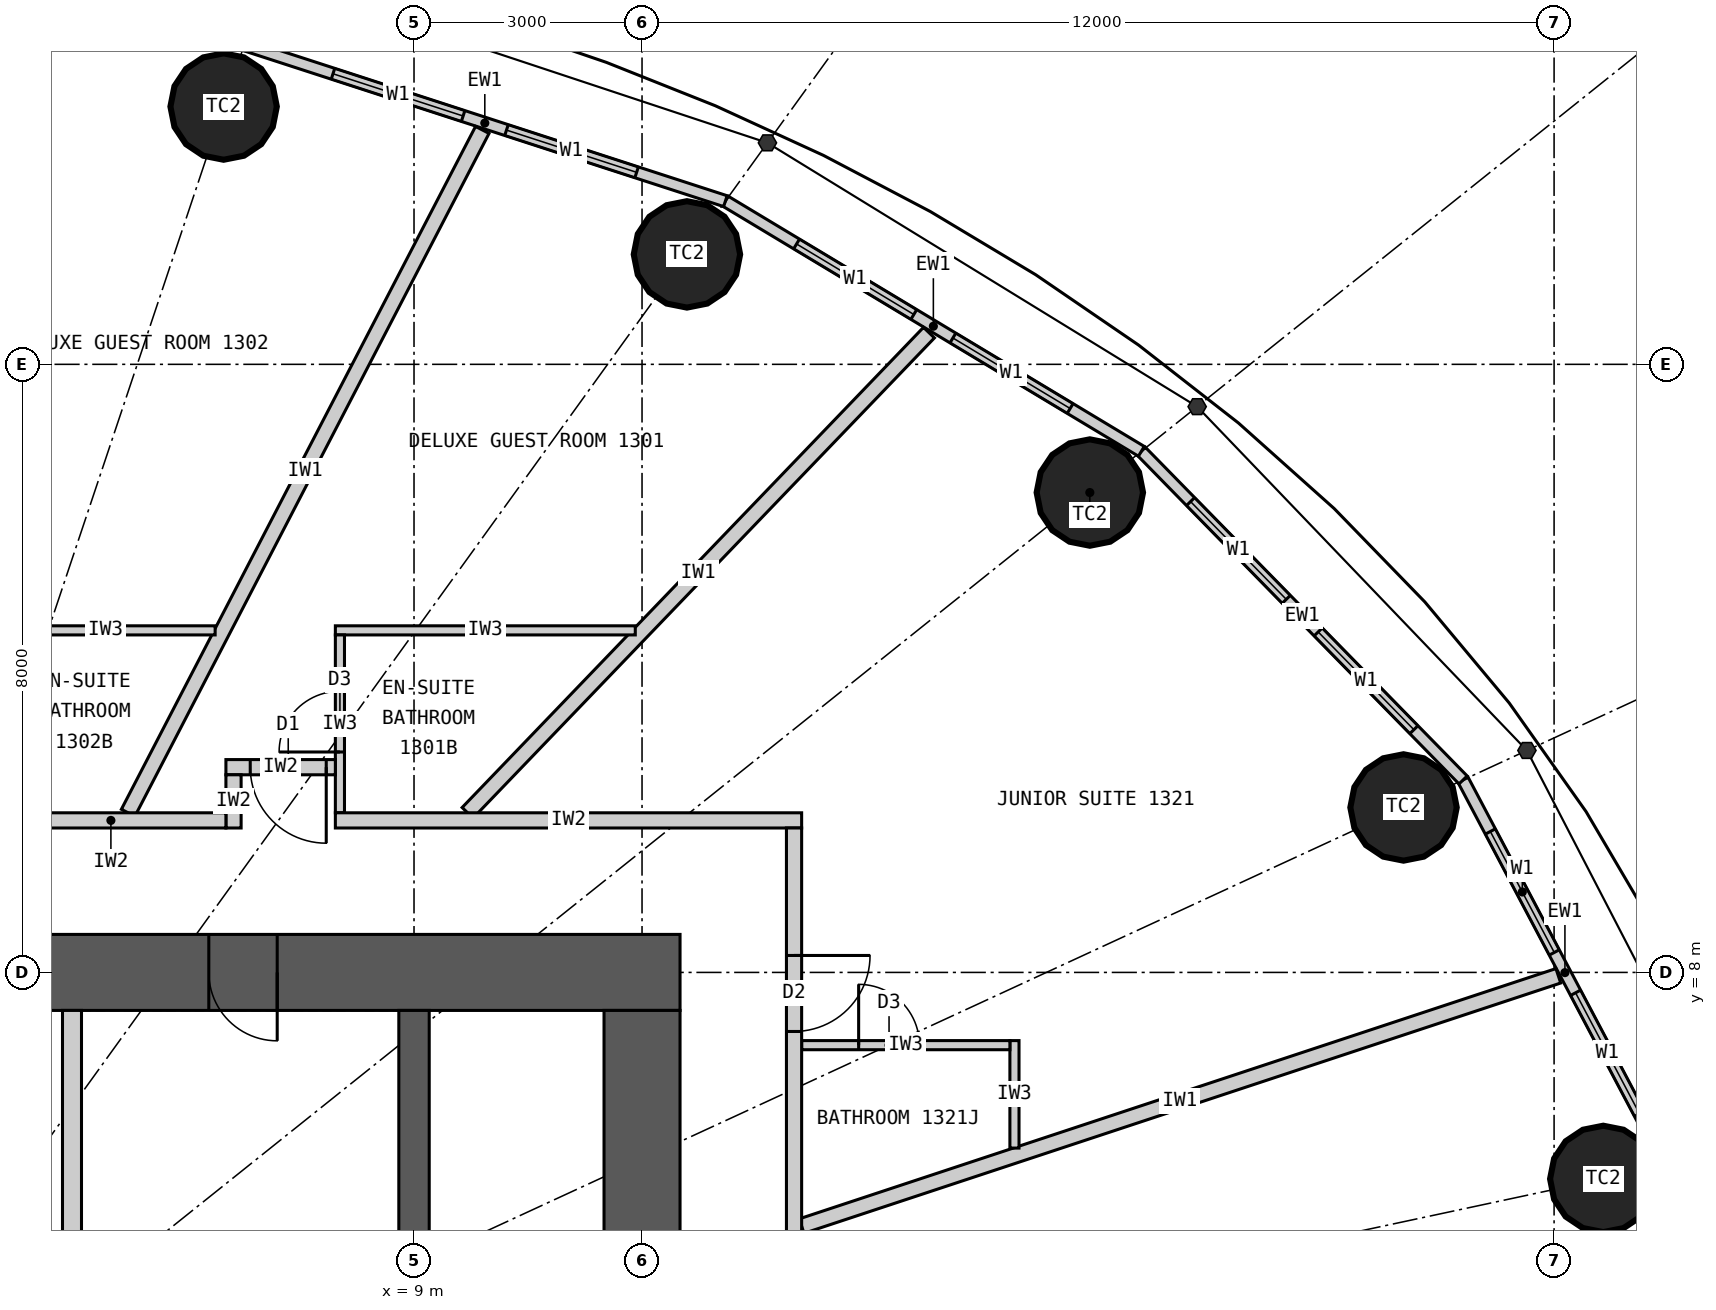
"""IFC4 building model, lengths in metres.
Left out: names, types, materials, properties, quantities, classifications, styles, units other than length and angle.
Written with IfcOpenShell. Run it as: python <this file> out.ifc"""

import sys

from ifc_helpers import new_model, si_unit, direction, frame, frame_2d, origin, origin_2d, place, context, subcontext, project, spatial, rectangle, circle, extrude, element, fill, save


model = new_model("IFC4")
c1 = context("Model", 3, precision=1e-05, world=origin(), true_north=direction((0.0, 1.0)))
c2 = subcontext(c1, "Body", "Model", "MODEL_VIEW")
j1 = project(units=[si_unit("LENGTHUNIT", "METRE"), si_unit("PLANEANGLEUNIT", "RADIAN")], contexts=[c1])
p1 = place(None, origin())
s1 = spatial("IfcSite", under=j1, at=p1, CompositionType="ELEMENT")
p2 = place(p1, origin())
s2 = spatial("IfcBuilding", under=s1, at=p2, CompositionType="ELEMENT")
p3 = place(p2, frame((0.0, 0.0, 57.3)))
s3 = spatial("IfcBuildingStorey", under=s2, at=p3, CompositionType="ELEMENT", Elevation=57.3)
for number, where, z_axis, x_axis in (
    (1, (24.647, 5.283, 0.0), (0.0, 0.0, 1.0), (1.0, 0.0, 0.0)),
    (2, (22.019, 10.17, 0.0), (0.0, 0.0, 1.0), (1.0, 0.0, 0.0)),
    (3, (17.892, 14.313, 0.0), (0.0, 0.0, 1.0), (1.0, 0.0, 0.0)),
    (4, (12.591, 17.447, 0.0), (0.0, 0.0, 1.0), (1.0, 0.0, 0.0)),
    (5, (6.495, 19.391, 0.0), (0.0, 0.0, 1.0), (1.0, 0.0, 0.0)),
):
    element("IfcColumn", number, at=place(p3, frame(where, z_axis=z_axis, x_axis=x_axis)), inside=s3, PredefinedType="COLUMN", context=c2, shape_type="SweptSolid", body=[
        extrude(circle(Radius=0.7, at=origin_2d()), origin(), (0.0, 0.0, 1.0), 3.3),
    ])
p4 = place(p3, frame((-12.5, 8.0, 0.0), z_axis=(0.0, 0.0, 1.0), x_axis=(1.0, 0.0, 0.0)))
e6 = element("IfcWall", 6, at=p4, inside=s3, PredefinedType="SHEAR", context=c2, shape_type="SweptSolid", body=[
    extrude(rectangle(XDim=25.0, YDim=1.0, at=frame_2d((12.5, 0.0))), origin(), (0.0, 0.0, 1.0), 3.3),
])
p5 = place(p4, frame((11.2, 0.0, 0.0)))
e7 = element("IfcOpeningElement", 7, at=p5, cuts=e6, PredefinedType="OPENING", context=c2, shape_type="SweptSolid", body=[
    extrude(rectangle(XDim=1.2, YDim=2.2, at=frame_2d((0.6, 1.1))), frame((0.0, 0.51, 0.0), z_axis=(0.0, -1.0, 0.0), x_axis=(1.0, 0.0, 0.0)), (0.0, 0.0, 1.0), 1.02),
])
p6 = place(p4, frame((18.8, 0.0, 0.0)))
e8 = element("IfcOpeningElement", 8, at=p6, cuts=e6, PredefinedType="OPENING", context=c2, shape_type="SweptSolid", body=[
    extrude(rectangle(XDim=0.9, YDim=2.2, at=frame_2d((0.45, 1.1))), frame((0.0, 0.51, 0.0), z_axis=(0.0, -1.0, 0.0), x_axis=(1.0, 0.0, 0.0)), (0.0, 0.0, 1.0), 1.02),
])
p7 = place(p3, frame((12.0, -7.5, 0.0), z_axis=(0.0, 0.0, 1.0), x_axis=(0.0, 1.0, 0.0)))
e9 = element("IfcWall", 9, at=p7, inside=s3, PredefinedType="SHEAR", context=c2, shape_type="SweptSolid", body=[
    extrude(rectangle(XDim=15.0, YDim=1.0, at=frame_2d((7.5, 0.0))), origin(), (0.0, 0.0, 1.0), 3.3),
])
p8 = place(p7, frame((6.6, 0.0, 0.0)))
e10 = element("IfcOpeningElement", 10, at=p8, cuts=e9, PredefinedType="OPENING", context=c2, shape_type="SweptSolid", body=[
    extrude(rectangle(XDim=1.8, YDim=2.2, at=frame_2d((0.9, 1.1))), frame((0.0, 0.51, 0.0), z_axis=(0.0, -1.0, 0.0), x_axis=(1.0, 0.0, 0.0)), (0.0, 0.0, 1.0), 1.02),
])
p9 = place(p3, frame((9.0, 4.5, 0.0), z_axis=(0.0, 0.0, 1.0), x_axis=(0.0, 1.0, 0.0)))
e11 = element("IfcWall", 11, at=p9, inside=s3, PredefinedType="SHEAR", context=c2, shape_type="SweptSolid", body=[
    extrude(rectangle(XDim=3.0, YDim=0.4, at=frame_2d((1.5, 0.0))), origin(), (0.0, 0.0, 1.0), 3.3),
])
p10 = place(p3, frame((4.5, 4.5, 0.0), z_axis=(0.0, 0.0, 1.0), x_axis=(0.0, 1.0, 0.0)))
e12 = element("IfcWall", 12, at=p10, inside=s3, PredefinedType="PARTITIONING", context=c2, shape_type="SweptSolid", body=[
    extrude(rectangle(XDim=3.0, YDim=0.25, at=frame_2d((1.5, 0.0))), origin(), (0.0, 0.0, 1.0), 3.3),
])
p11 = place(p3, frame((25.482, 5.462, 0.0), z_axis=(0.0, 0.0, 1.0), x_axis=(-0.467296867008, 0.884100468321, 0.0)))
e13 = element("IfcWall", 13, at=p11, inside=s3, PredefinedType="ELEMENTEDWALL", context=c2, shape_type="SweptSolid", body=[
    extrude(rectangle(XDim=5.734, YDim=0.15, at=frame_2d((2.867, 0.0))), origin(), (0.0, 0.0, 1.0), 3.12),
])
p12 = place(p11, frame((0.767, 0.0, 0.9)))
e14 = element("IfcOpeningElement", 14, at=p12, cuts=e13, PredefinedType="OPENING", context=c2, shape_type="SweptSolid", body=[
    extrude(rectangle(XDim=1.8, YDim=1.9, at=frame_2d((0.9, 0.95))), frame((0.0, 0.085, 0.0), z_axis=(0.0, -1.0, 0.0), x_axis=(1.0, 0.0, 0.0)), (0.0, 0.0, 1.0), 0.17),
])
p13 = place(p11, frame((3.167, 0.0, 0.9)))
e15 = element("IfcOpeningElement", 15, at=p13, cuts=e13, PredefinedType="OPENING", context=c2, shape_type="SweptSolid", body=[
    extrude(rectangle(XDim=1.8, YDim=1.9, at=frame_2d((0.9, 0.95))), frame((0.0, 0.085, 0.0), z_axis=(0.0, -1.0, 0.0), x_axis=(1.0, 0.0, 0.0)), (0.0, 0.0, 1.0), 0.17),
])
p14 = place(p3, frame((22.803, 10.532, 0.0), z_axis=(0.0, 0.0, 1.0), x_axis=(-0.699602905915, 0.714531856557, 0.0)))
e16 = element("IfcWall", 16, at=p14, inside=s3, PredefinedType="ELEMENTEDWALL", context=c2, shape_type="SweptSolid", body=[
    extrude(rectangle(XDim=6.051, YDim=0.15, at=frame_2d((3.025, 0.0))), origin(), (0.0, 0.0, 1.0), 3.12),
])
p15 = place(p14, frame((0.926, 0.0, 0.9)))
e17 = element("IfcOpeningElement", 17, at=p15, cuts=e16, PredefinedType="OPENING", context=c2, shape_type="SweptSolid", body=[
    extrude(rectangle(XDim=1.8, YDim=1.9, at=frame_2d((0.9, 0.95))), frame((0.0, 0.085, 0.0), z_axis=(0.0, -1.0, 0.0), x_axis=(1.0, 0.0, 0.0)), (0.0, 0.0, 1.0), 0.17),
])
p16 = place(p14, frame((3.325, 0.0, 0.9)))
e18 = element("IfcOpeningElement", 18, at=p16, cuts=e16, PredefinedType="OPENING", context=c2, shape_type="SweptSolid", body=[
    extrude(rectangle(XDim=1.8, YDim=1.9, at=frame_2d((0.9, 0.95))), frame((0.0, 0.085, 0.0), z_axis=(0.0, -1.0, 0.0), x_axis=(1.0, 0.0, 0.0)), (0.0, 0.0, 1.0), 0.17),
])
p17 = place(p3, frame((18.57, 14.856, 0.0), z_axis=(0.0, 0.0, 1.0), x_axis=(-0.856983180864, 0.515344377787, 0.0)))
e19 = element("IfcWall", 19, at=p17, inside=s3, PredefinedType="ELEMENTEDWALL", context=c2, shape_type="SweptSolid", body=[
    extrude(rectangle(XDim=6.386, YDim=0.15, at=frame_2d((3.193, 0.0))), origin(), (0.0, 0.0, 1.0), 3.12),
])
p18 = place(p17, frame((1.093, 0.0, 0.9)))
e20 = element("IfcOpeningElement", 20, at=p18, cuts=e19, PredefinedType="OPENING", context=c2, shape_type="SweptSolid", body=[
    extrude(rectangle(XDim=1.8, YDim=1.9, at=frame_2d((0.9, 0.95))), frame((0.0, 0.085, 0.0), z_axis=(0.0, -1.0, 0.0), x_axis=(1.0, 0.0, 0.0)), (0.0, 0.0, 1.0), 0.17),
])
p19 = place(p17, frame((3.493, 0.0, 0.9)))
e21 = element("IfcOpeningElement", 21, at=p19, cuts=e19, PredefinedType="OPENING", context=c2, shape_type="SweptSolid", body=[
    extrude(rectangle(XDim=1.8, YDim=1.9, at=frame_2d((0.9, 0.95))), frame((0.0, 0.085, 0.0), z_axis=(0.0, -1.0, 0.0), x_axis=(1.0, 0.0, 0.0)), (0.0, 0.0, 1.0), 0.17),
])
p20 = place(p3, frame((13.096, 18.147, 0.0), z_axis=(0.0, 0.0, 1.0), x_axis=(-0.951137534625, 0.308767534285, 0.0)))
e22 = element("IfcWall", 22, at=p20, inside=s3, PredefinedType="ELEMENTEDWALL", context=c2, shape_type="SweptSolid", body=[
    extrude(rectangle(XDim=6.655, YDim=0.15, at=frame_2d((3.328, 0.0))), origin(), (0.0, 0.0, 1.0), 3.12),
])
p21 = place(p20, frame((1.228, 0.0, 0.9)))
e23 = element("IfcOpeningElement", 23, at=p21, cuts=e22, PredefinedType="OPENING", context=c2, shape_type="SweptSolid", body=[
    extrude(rectangle(XDim=1.8, YDim=1.9, at=frame_2d((0.9, 0.95))), frame((0.0, 0.085, 0.0), z_axis=(0.0, -1.0, 0.0), x_axis=(1.0, 0.0, 0.0)), (0.0, 0.0, 1.0), 0.17),
])
p22 = place(p20, frame((3.628, 0.0, 0.9)))
e24 = element("IfcOpeningElement", 24, at=p22, cuts=e22, PredefinedType="OPENING", context=c2, shape_type="SweptSolid", body=[
    extrude(rectangle(XDim=1.8, YDim=1.9, at=frame_2d((0.9, 0.95))), frame((0.0, 0.085, 0.0), z_axis=(0.0, -1.0, 0.0), x_axis=(1.0, 0.0, 0.0)), (0.0, 0.0, 1.0), 0.17),
])
p23 = place(p3, frame((14.1, 4.663, 0.0), z_axis=(0.0, 0.0, 1.0), x_axis=(0.949432655039, 0.31397075269, 0.0)))
e25 = element("IfcWall", 25, at=p23, inside=s3, PredefinedType="PARTITIONING", context=c2, shape_type="SweptSolid", body=[
    extrude(rectangle(XDim=10.486, YDim=0.2, at=frame_2d((5.243, 0.0))), origin(), (0.0, 0.0, 1.0), 3.12),
])
p24 = place(p3, frame((9.705, 10.1, 0.0), z_axis=(0.0, 0.0, 1.0), x_axis=(0.692879226267, 0.721053658064, 0.0)))
e26 = element("IfcWall", 26, at=p24, inside=s3, PredefinedType="PARTITIONING", context=c2, shape_type="SweptSolid", body=[
    extrude(rectangle(XDim=8.761, YDim=0.2, at=frame_2d((4.38, 0.0))), origin(), (0.0, 0.0, 1.0), 3.12),
])
p25 = place(p3, frame((5.239, 10.1, 0.0), z_axis=(0.0, 0.0, 1.0), x_axis=(0.460422783389, 0.887699758103, 0.0)))
e27 = element("IfcWall", 27, at=p25, inside=s3, PredefinedType="PARTITIONING", context=c2, shape_type="SweptSolid", body=[
    extrude(rectangle(XDim=10.12, YDim=0.2, at=frame_2d((5.06, 0.0))), origin(), (0.0, 0.0, 1.0), 3.12),
])
p26 = place(p3, frame((11.911, 12.5, 0.0), z_axis=(0.0, 0.0, 1.0), x_axis=(-1.0, 0.0, 0.0)))
e28 = element("IfcWall", 28, at=p26, inside=s3, PredefinedType="PARTITIONING", context=c2, shape_type="SweptSolid", body=[
    extrude(rectangle(XDim=3.946, YDim=0.12, at=frame_2d((1.973, 0.0))), origin(), (0.0, 0.0, 1.0), 3.12),
])
p27 = place(p3, frame((8.025, 10.1, 0.0), z_axis=(0.0, 0.0, 1.0), x_axis=(0.0, 1.0, 0.0)))
e29 = element("IfcWall", 29, at=p27, inside=s3, PredefinedType="PARTITIONING", context=c2, shape_type="SweptSolid", body=[
    extrude(rectangle(XDim=2.34, YDim=0.12, at=frame_2d((1.17, 0.0))), origin(), (0.0, 0.0, 1.0), 3.12),
])
p28 = place(p27, frame((0.8, 0.0, 0.0)))
e30 = element("IfcOpeningElement", 30, at=p28, cuts=e29, PredefinedType="OPENING", context=c2, shape_type="SweptSolid", body=[
    extrude(rectangle(XDim=0.8, YDim=2.1, at=frame_2d((0.4, 1.05))), frame((0.0, 0.07, 0.0), z_axis=(0.0, -1.0, 0.0), x_axis=(1.0, 0.0, 0.0)), (0.0, 0.0, 1.0), 0.14),
])
p29 = place(p3, frame((6.383, 12.5, 0.0), z_axis=(0.0, 0.0, 1.0), x_axis=(-1.0, 0.0, 0.0)))
e31 = element("IfcWall", 31, at=p29, inside=s3, PredefinedType="PARTITIONING", context=c2, shape_type="SweptSolid", body=[
    extrude(rectangle(XDim=2.885, YDim=0.12, at=frame_2d((1.442, 0.0))), origin(), (0.0, 0.0, 1.0), 3.12),
])
p30 = place(p3, frame((16.9, 5.689, 0.0), z_axis=(0.0, 0.0, 1.0), x_axis=(0.0, 1.0, 0.0)))
e32 = element("IfcWall", 32, at=p30, inside=s3, PredefinedType="PARTITIONING", context=c2, shape_type="SweptSolid", body=[
    extrude(rectangle(XDim=1.414, YDim=0.12, at=frame_2d((0.707, 0.0))), origin(), (0.0, 0.0, 1.0), 3.12),
])
p31 = place(p3, frame((14.1, 7.043, 0.0), z_axis=(0.0, 0.0, 1.0), x_axis=(1.0, 0.0, 0.0)))
e33 = element("IfcWall", 33, at=p31, inside=s3, PredefinedType="PARTITIONING", context=c2, shape_type="SweptSolid", body=[
    extrude(rectangle(XDim=2.74, YDim=0.12, at=frame_2d((1.37, 0.0))), origin(), (0.0, 0.0, 1.0), 3.12),
])
p32 = place(p31, frame((0.75, 0.0, 0.0)))
e34 = element("IfcOpeningElement", 34, at=p32, cuts=e33, PredefinedType="OPENING", context=c2, shape_type="SweptSolid", body=[
    extrude(rectangle(XDim=0.8, YDim=2.1, at=frame_2d((0.4, 1.05))), frame((0.0, 0.07, 0.0), z_axis=(0.0, -1.0, 0.0), x_axis=(1.0, 0.0, 0.0)), (0.0, 0.0, 1.0), 0.14),
])
p33 = place(p3, frame((6.525, 10.7, 0.0), z_axis=(0.0, 0.0, 1.0), x_axis=(1.0, 0.0, 0.0)))
e35 = element("IfcWall", 35, at=p33, inside=s3, PredefinedType="PARTITIONING", context=c2, shape_type="SweptSolid", body=[
    extrude(rectangle(XDim=1.44, YDim=0.2, at=frame_2d((0.72, 0.0))), origin(), (0.0, 0.0, 1.0), 3.12),
])
p34 = place(p33, frame((0.32, 0.0, 0.0)))
e36 = element("IfcOpeningElement", 36, at=p34, cuts=e35, PredefinedType="OPENING", context=c2, shape_type="SweptSolid", body=[
    extrude(rectangle(XDim=1.0, YDim=2.2, at=frame_2d((0.5, 1.1))), frame((0.0, 0.11, 0.0), z_axis=(0.0, -1.0, 0.0), x_axis=(1.0, 0.0, 0.0)), (0.0, 0.0, 1.0), 0.22),
])
p35 = place(p3, frame((6.625, 9.9, 0.0), z_axis=(0.0, 0.0, 1.0), x_axis=(0.0, 1.0, 0.0)))
e37 = element("IfcWall", 37, at=p35, inside=s3, PredefinedType="PARTITIONING", context=c2, shape_type="SweptSolid", body=[
    extrude(rectangle(XDim=0.7, YDim=0.2, at=frame_2d((0.35, 0.0))), origin(), (0.0, 0.0, 1.0), 3.12),
])
p36 = place(p3, frame((3.499, 10.0, 0.0), z_axis=(0.0, 0.0, 1.0), x_axis=(1.0, 0.0, 0.0)))
e38 = element("IfcWall", 38, at=p36, inside=s3, PredefinedType="PARTITIONING", context=c2, shape_type="SweptSolid", body=[
    extrude(rectangle(XDim=3.027, YDim=0.2, at=frame_2d((1.513, 0.0))), origin(), (0.0, 0.0, 1.0), 3.12),
])
p37 = place(p3, frame((7.965, 10.0, 0.0), z_axis=(0.0, 0.0, 1.0), x_axis=(1.0, 0.0, 0.0)))
e39 = element("IfcWall", 39, at=p37, inside=s3, PredefinedType="PARTITIONING", context=c2, shape_type="SweptSolid", body=[
    extrude(rectangle(XDim=6.135, YDim=0.2, at=frame_2d((3.067, 0.0))), origin(), (0.0, 0.0, 1.0), 3.12),
])
p38 = place(p3, frame((14.0, -5.459, 0.0), z_axis=(0.0, 0.0, 1.0), x_axis=(0.0, 1.0, 0.0)))
e40 = element("IfcWall", 40, at=p38, inside=s3, PredefinedType="PARTITIONING", context=c2, shape_type="SweptSolid", body=[
    extrude(rectangle(XDim=15.359, YDim=0.2, at=frame_2d((7.679, 0.0))), origin(), (0.0, 0.0, 1.0), 3.12),
])
p39 = place(p38, frame((2.656, 0.0, 0.0)))
e41 = element("IfcOpeningElement", 41, at=p39, cuts=e40, PredefinedType="OPENING", context=c2, shape_type="SweptSolid", body=[
    extrude(rectangle(XDim=1.0, YDim=2.2, at=frame_2d((0.5, 1.1))), frame((0.0, 0.11, 0.0), z_axis=(0.0, -1.0, 0.0), x_axis=(1.0, 0.0, 0.0)), (0.0, 0.0, 1.0), 0.22),
])
p40 = place(p38, frame((6.537, 0.0, 0.0)))
e42 = element("IfcOpeningElement", 42, at=p40, cuts=e40, PredefinedType="OPENING", context=c2, shape_type="SweptSolid", body=[
    extrude(rectangle(XDim=1.0, YDim=2.2, at=frame_2d((0.5, 1.1))), frame((0.0, 0.11, 0.0), z_axis=(0.0, -1.0, 0.0), x_axis=(1.0, 0.0, 0.0)), (0.0, 0.0, 1.0), 0.22),
])
p41 = place(p38, frame((12.682, 0.0, 0.0)))
e43 = element("IfcOpeningElement", 43, at=p41, cuts=e40, PredefinedType="OPENING", context=c2, shape_type="SweptSolid", body=[
    extrude(rectangle(XDim=1.0, YDim=2.2, at=frame_2d((0.5, 1.1))), frame((0.0, 0.11, 0.0), z_axis=(0.0, -1.0, 0.0), x_axis=(1.0, 0.0, 0.0)), (0.0, 0.0, 1.0), 0.22),
])
p42 = place(p12, origin())
e44 = element("IfcWindow", 44, at=p42, inside=s3, PartitioningType="SINGLE_PANEL", PredefinedType="WINDOW", context=c2, shape_type="SweptSolid", body=[
    extrude(rectangle(XDim=1.8, YDim=1.9, at=frame_2d((0.9, 0.95))), frame((0.0, 0.03, 0.0), z_axis=(0.0, -1.0, 0.0), x_axis=(1.0, 0.0, 0.0)), (0.0, 0.0, 1.0), 0.06),
])
fill(e14, e44)
p43 = place(p13, origin())
e45 = element("IfcWindow", 45, at=p43, inside=s3, PartitioningType="SINGLE_PANEL", PredefinedType="WINDOW", context=c2, shape_type="SweptSolid", body=[
    extrude(rectangle(XDim=1.8, YDim=1.9, at=frame_2d((0.9, 0.95))), frame((0.0, 0.03, 0.0), z_axis=(0.0, -1.0, 0.0), x_axis=(1.0, 0.0, 0.0)), (0.0, 0.0, 1.0), 0.06),
])
fill(e15, e45)
p44 = place(p15, origin())
e46 = element("IfcWindow", 46, at=p44, inside=s3, PartitioningType="SINGLE_PANEL", PredefinedType="WINDOW", context=c2, shape_type="SweptSolid", body=[
    extrude(rectangle(XDim=1.8, YDim=1.9, at=frame_2d((0.9, 0.95))), frame((0.0, 0.03, 0.0), z_axis=(0.0, -1.0, 0.0), x_axis=(1.0, 0.0, 0.0)), (0.0, 0.0, 1.0), 0.06),
])
fill(e17, e46)
p45 = place(p16, origin())
e47 = element("IfcWindow", 47, at=p45, inside=s3, PartitioningType="SINGLE_PANEL", PredefinedType="WINDOW", context=c2, shape_type="SweptSolid", body=[
    extrude(rectangle(XDim=1.8, YDim=1.9, at=frame_2d((0.9, 0.95))), frame((0.0, 0.03, 0.0), z_axis=(0.0, -1.0, 0.0), x_axis=(1.0, 0.0, 0.0)), (0.0, 0.0, 1.0), 0.06),
])
fill(e18, e47)
p46 = place(p18, origin())
e48 = element("IfcWindow", 48, at=p46, inside=s3, PartitioningType="SINGLE_PANEL", PredefinedType="WINDOW", context=c2, shape_type="SweptSolid", body=[
    extrude(rectangle(XDim=1.8, YDim=1.9, at=frame_2d((0.9, 0.95))), frame((0.0, 0.03, 0.0), z_axis=(0.0, -1.0, 0.0), x_axis=(1.0, 0.0, 0.0)), (0.0, 0.0, 1.0), 0.06),
])
fill(e20, e48)
p47 = place(p19, origin())
e49 = element("IfcWindow", 49, at=p47, inside=s3, PartitioningType="SINGLE_PANEL", PredefinedType="WINDOW", context=c2, shape_type="SweptSolid", body=[
    extrude(rectangle(XDim=1.8, YDim=1.9, at=frame_2d((0.9, 0.95))), frame((0.0, 0.03, 0.0), z_axis=(0.0, -1.0, 0.0), x_axis=(1.0, 0.0, 0.0)), (0.0, 0.0, 1.0), 0.06),
])
fill(e21, e49)
p48 = place(p21, origin())
e50 = element("IfcWindow", 50, at=p48, inside=s3, PartitioningType="SINGLE_PANEL", PredefinedType="WINDOW", context=c2, shape_type="SweptSolid", body=[
    extrude(rectangle(XDim=1.8, YDim=1.9, at=frame_2d((0.9, 0.95))), frame((0.0, 0.03, 0.0), z_axis=(0.0, -1.0, 0.0), x_axis=(1.0, 0.0, 0.0)), (0.0, 0.0, 1.0), 0.06),
])
fill(e23, e50)
p49 = place(p22, origin())
e51 = element("IfcWindow", 51, at=p49, inside=s3, PartitioningType="SINGLE_PANEL", PredefinedType="WINDOW", context=c2, shape_type="SweptSolid", body=[
    extrude(rectangle(XDim=1.8, YDim=1.9, at=frame_2d((0.9, 0.95))), frame((0.0, 0.03, 0.0), z_axis=(0.0, -1.0, 0.0), x_axis=(1.0, 0.0, 0.0)), (0.0, 0.0, 1.0), 0.06),
])
fill(e24, e51)
p50 = place(p28, origin())
e52 = element("IfcDoor", 52, at=p50, inside=s3, OperationType="SINGLE_SWING_LEFT", PredefinedType="DOOR", context=c2, shape_type="SweptSolid", body=[
    extrude(rectangle(XDim=0.8, YDim=2.1, at=frame_2d((0.4, 1.05))), frame((0.0, 0.025, 0.0), z_axis=(0.0, -1.0, 0.0), x_axis=(1.0, 0.0, 0.0)), (0.0, 0.0, 1.0), 0.05),
])
fill(e30, e52)
p51 = place(p34, origin())
e53 = element("IfcDoor", 53, at=p51, inside=s3, OperationType="SINGLE_SWING_RIGHT", PredefinedType="DOOR", context=c2, shape_type="SweptSolid", body=[
    extrude(rectangle(XDim=1.0, YDim=2.2, at=frame_2d((0.5, 1.1))), frame((0.0, 0.025, 0.0), z_axis=(0.0, -1.0, 0.0), x_axis=(1.0, 0.0, 0.0)), (0.0, 0.0, 1.0), 0.05),
])
fill(e36, e53)
p52 = place(p32, origin())
e54 = element("IfcDoor", 54, at=p52, inside=s3, OperationType="SINGLE_SWING_LEFT", PredefinedType="DOOR", context=c2, shape_type="SweptSolid", body=[
    extrude(rectangle(XDim=0.8, YDim=2.1, at=frame_2d((0.4, 1.05))), frame((0.0, 0.025, 0.0), z_axis=(0.0, -1.0, 0.0), x_axis=(1.0, 0.0, 0.0)), (0.0, 0.0, 1.0), 0.05),
])
fill(e34, e54)
p53 = place(p41, origin())
e55 = element("IfcDoor", 55, at=p53, inside=s3, OperationType="SINGLE_SWING_RIGHT", PredefinedType="DOOR", context=c2, shape_type="SweptSolid", body=[
    extrude(rectangle(XDim=1.0, YDim=2.2, at=frame_2d((0.5, 1.1))), frame((0.0, 0.025, 0.0), z_axis=(0.0, -1.0, 0.0), x_axis=(1.0, 0.0, 0.0)), (0.0, 0.0, 1.0), 0.05),
])
fill(e43, e55)
p54 = place(p6, origin())
e56 = element("IfcDoor", 56, at=p54, inside=s3, OperationType="SINGLE_SWING_RIGHT", PredefinedType="DOOR", context=c2, shape_type="SweptSolid", body=[
    extrude(rectangle(XDim=0.9, YDim=2.2, at=frame_2d((0.45, 1.1))), frame((0.0, 0.025, 0.0), z_axis=(0.0, -1.0, 0.0), x_axis=(1.0, 0.0, 0.0)), (0.0, 0.0, 1.0), 0.05),
])
fill(e8, e56)
save(model, sys.argv[1])
